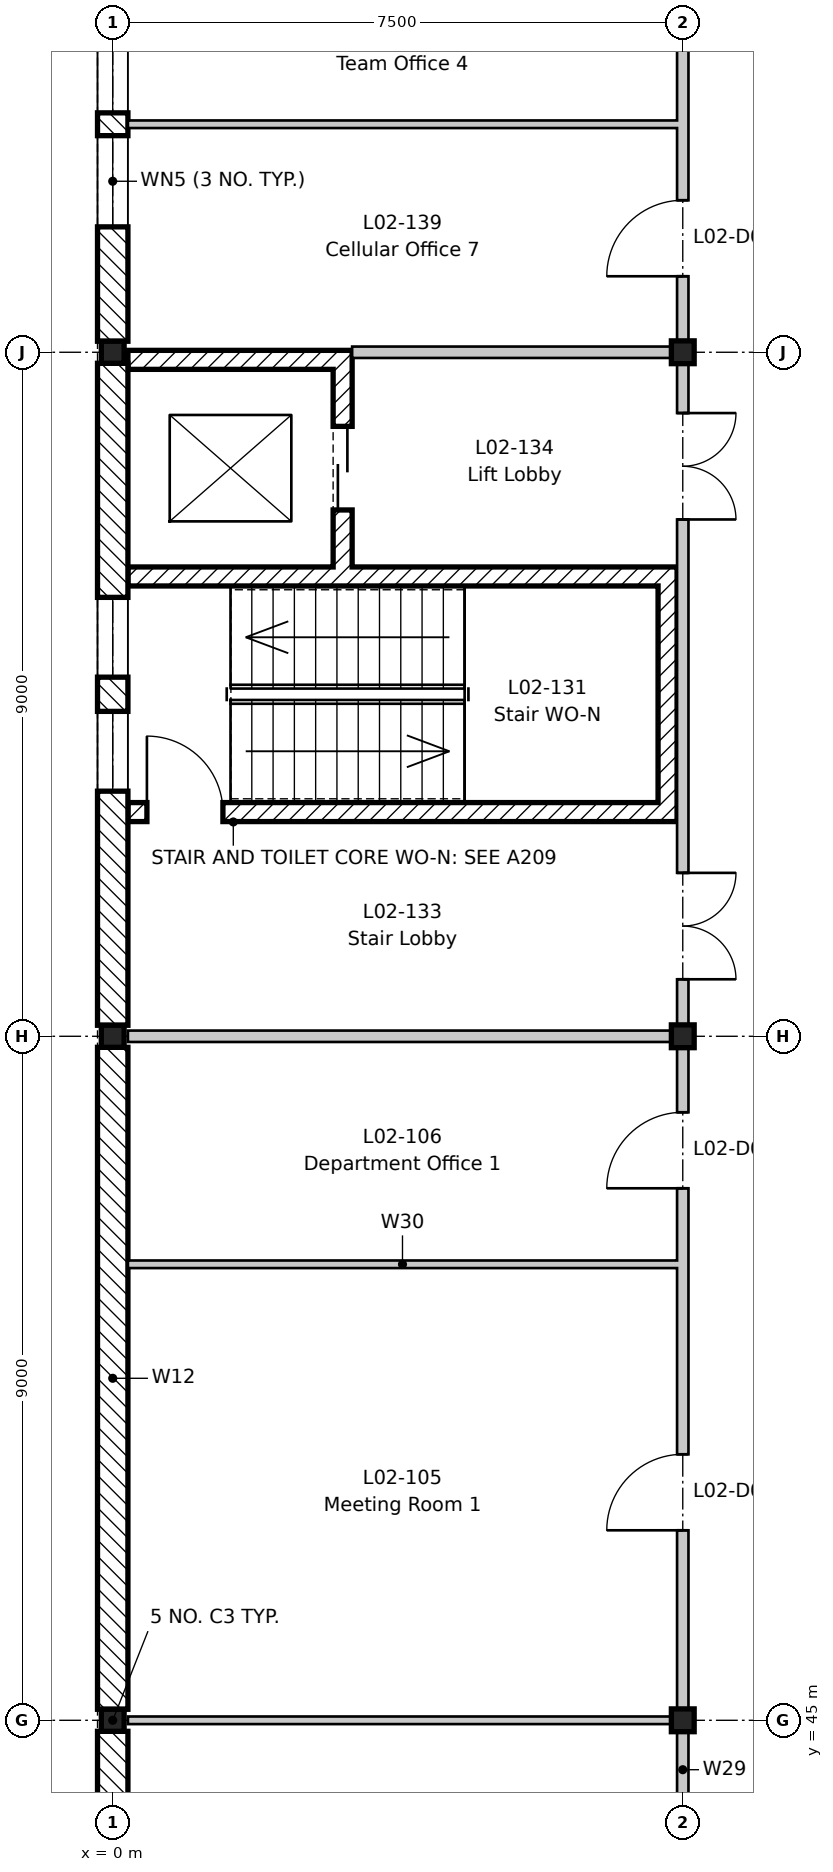
"""IFC4 building model, lengths in metres.
Left out: names, types, materials, properties, quantities, classifications, styles, units other than length and angle.
Written with IfcOpenShell. Run it as: python <this file> out.ifc"""

import sys

from ifc_helpers import new_model, si_unit, direction, frame, frame_2d, origin, origin_2d, place, context, subcontext, project, spatial, rectangle, i_section, extrude, element, fill, save


model = new_model("IFC4")
c1 = context("Model", 3, precision=1e-05, world=origin(), true_north=direction((0.0, 1.0)))
c2 = subcontext(c1, "Body", "Model", "MODEL_VIEW")
j1 = project(units=[si_unit("LENGTHUNIT", "METRE"), si_unit("PLANEANGLEUNIT", "RADIAN")], contexts=[c1])
p1 = place(None, origin())
s1 = spatial("IfcSite", under=j1, at=p1, CompositionType="ELEMENT")
p2 = place(p1, origin())
s2 = spatial("IfcBuilding", under=s1, at=p2, CompositionType="ELEMENT")
p3 = place(p2, frame((0.0, 0.0, 9.9)))
s3 = spatial("IfcBuildingStorey", under=s2, at=p3, CompositionType="ELEMENT", Elevation=9.9)
for number, where, z_axis, x_axis in (
    (1, (0.0, 45.0, -0.2), (0.0, 0.0, 1.0), (1.0, 0.0, 0.0)),
    (2, (0.0, 54.0, -0.2), (0.0, 0.0, 1.0), (1.0, 0.0, 0.0)),
    (3, (0.0, 63.0, -0.2), (0.0, 0.0, 1.0), (1.0, 0.0, 0.0)),
):
    element("IfcColumn", number, at=place(p3, frame(where, z_axis=z_axis, x_axis=x_axis)), inside=s3, PredefinedType="COLUMN", context=c2, shape_type="SweptSolid", body=[
        extrude(i_section(OverallWidth=0.3, OverallDepth=0.29, WebThickness=0.009, FlangeThickness=0.014, FilletRadius=0.027, at=origin_2d()), origin(), (0.0, 0.0, 1.0), 4.5),
    ])
for number, where, z_axis, x_axis in (
    (4, (7.5, 45.0, -0.2), (0.0, 0.0, 1.0), (1.0, 0.0, 0.0)),
    (5, (7.5, 54.0, -0.2), (0.0, 0.0, 1.0), (1.0, 0.0, 0.0)),
    (6, (7.5, 63.0, -0.2), (0.0, 0.0, 1.0), (1.0, 0.0, 0.0)),
):
    element("IfcColumn", number, at=place(p3, frame(where, z_axis=z_axis, x_axis=x_axis)), inside=s3, PredefinedType="COLUMN", context=c2, shape_type="SweptSolid", body=[
        extrude(i_section(OverallWidth=0.3, OverallDepth=0.3, WebThickness=0.011, FlangeThickness=0.019, FilletRadius=0.027, at=origin_2d()), origin(), (0.0, 0.0, 1.0), 4.5),
    ])
p4 = place(p3, frame((0.2, 56.95, 0.0), z_axis=(0.0, 0.0, 1.0), x_axis=(1.0, 0.0, 0.0)))
e7 = element("IfcWall", 7, at=p4, inside=s3, PredefinedType="SHEAR", context=c2, shape_type="SweptSolid", body=[
    extrude(rectangle(XDim=7.225, YDim=0.25, at=frame_2d((3.613, 0.0))), origin(), (0.0, 0.0, 1.0), 4.3),
])
p5 = place(p4, frame((0.25, 0.0, 0.0)))
e8 = element("IfcOpeningElement", 8, at=p5, cuts=e7, PredefinedType="OPENING", context=c2, shape_type="SweptSolid", body=[
    extrude(rectangle(XDim=1.0, YDim=2.1, at=frame_2d((0.5, 1.05))), frame((0.0, 0.135, 0.0), z_axis=(0.0, -1.0, 0.0), x_axis=(1.0, 0.0, 0.0)), (0.0, 0.0, 1.0), 0.27),
])
p6 = place(p3, frame((0.2, 60.05, 0.0), z_axis=(0.0, 0.0, 1.0), x_axis=(1.0, 0.0, 0.0)))
e9 = element("IfcWall", 9, at=p6, inside=s3, PredefinedType="SHEAR", context=c2, shape_type="SweptSolid", body=[
    extrude(rectangle(XDim=7.225, YDim=0.25, at=frame_2d((3.613, 0.0))), origin(), (0.0, 0.0, 1.0), 4.3),
])
p7 = place(p3, frame((7.3, 57.075, 0.0), z_axis=(0.0, 0.0, 1.0), x_axis=(0.0, 1.0, 0.0)))
e10 = element("IfcWall", 10, at=p7, inside=s3, PredefinedType="SHEAR", context=c2, shape_type="SweptSolid", body=[
    extrude(rectangle(XDim=2.85, YDim=0.25, at=frame_2d((1.425, 0.0))), origin(), (0.0, 0.0, 1.0), 4.3),
])
p8 = place(p3, frame((3.025, 60.175, 0.0), z_axis=(0.0, 0.0, 1.0), x_axis=(0.0, 1.0, 0.0)))
e11 = element("IfcWall", 11, at=p8, inside=s3, PredefinedType="SHEAR", context=c2, shape_type="SweptSolid", body=[
    extrude(rectangle(XDim=2.6, YDim=0.25, at=frame_2d((1.3, 0.0))), origin(), (0.0, 0.0, 1.0), 4.3),
])
p9 = place(p8, frame((0.75, 0.0, 0.0)))
e12 = element("IfcOpeningElement", 12, at=p9, cuts=e11, PredefinedType="OPENING", context=c2, shape_type="SweptSolid", body=[
    extrude(rectangle(XDim=1.1, YDim=2.1, at=frame_2d((0.55, 1.05))), frame((0.0, 0.135, 0.0), z_axis=(0.0, -1.0, 0.0), x_axis=(1.0, 0.0, 0.0)), (0.0, 0.0, 1.0), 0.27),
])
p10 = place(p3, frame((0.2, 62.9, 0.0), z_axis=(0.0, 0.0, 1.0), x_axis=(1.0, 0.0, 0.0)))
e13 = element("IfcWall", 13, at=p10, inside=s3, PredefinedType="SHEAR", context=c2, shape_type="SweptSolid", body=[
    extrude(rectangle(XDim=2.95, YDim=0.25, at=frame_2d((1.475, 0.0))), origin(), (0.0, 0.0, 1.0), 4.3),
])
p11 = place(p3, frame((0.0, 36.145, 0.0), z_axis=(0.0, 0.0, 1.0), x_axis=(0.0, 1.0, 0.0)))
e14 = element("IfcWall", 14, at=p11, inside=s3, PredefinedType="STANDARD", context=c2, shape_type="SweptSolid", body=[
    extrude(rectangle(XDim=8.71, YDim=0.4, at=frame_2d((4.355, 0.0))), origin(), (0.0, 0.0, 1.0), 3.9),
])
p12 = place(p11, frame((1.505, 0.0, 0.6)))
e15 = element("IfcOpeningElement", 15, at=p12, cuts=e14, PredefinedType="OPENING", context=c2, shape_type="SweptSolid", body=[
    extrude(rectangle(XDim=1.2, YDim=3.0, at=frame_2d((0.6, 1.5))), frame((0.0, 0.21, 0.0), z_axis=(0.0, -1.0, 0.0), x_axis=(1.0, 0.0, 0.0)), (0.0, 0.0, 1.0), 0.42),
])
p13 = place(p11, frame((3.005, 0.0, 0.6)))
e16 = element("IfcOpeningElement", 16, at=p13, cuts=e14, PredefinedType="OPENING", context=c2, shape_type="SweptSolid", body=[
    extrude(rectangle(XDim=1.2, YDim=3.0, at=frame_2d((0.6, 1.5))), frame((0.0, 0.21, 0.0), z_axis=(0.0, -1.0, 0.0), x_axis=(1.0, 0.0, 0.0)), (0.0, 0.0, 1.0), 0.42),
])
p14 = place(p11, frame((4.505, 0.0, 0.6)))
e17 = element("IfcOpeningElement", 17, at=p14, cuts=e14, PredefinedType="OPENING", context=c2, shape_type="SweptSolid", body=[
    extrude(rectangle(XDim=1.2, YDim=3.0, at=frame_2d((0.6, 1.5))), frame((0.0, 0.21, 0.0), z_axis=(0.0, -1.0, 0.0), x_axis=(1.0, 0.0, 0.0)), (0.0, 0.0, 1.0), 0.42),
])
p15 = place(p11, frame((6.005, 0.0, 0.6)))
e18 = element("IfcOpeningElement", 18, at=p15, cuts=e14, PredefinedType="OPENING", context=c2, shape_type="SweptSolid", body=[
    extrude(rectangle(XDim=1.2, YDim=3.0, at=frame_2d((0.6, 1.5))), frame((0.0, 0.21, 0.0), z_axis=(0.0, -1.0, 0.0), x_axis=(1.0, 0.0, 0.0)), (0.0, 0.0, 1.0), 0.42),
])
p16 = place(p3, frame((0.0, 45.145, 0.0), z_axis=(0.0, 0.0, 1.0), x_axis=(0.0, 1.0, 0.0)))
e19 = element("IfcWall", 19, at=p16, inside=s3, PredefinedType="STANDARD", context=c2, shape_type="SweptSolid", body=[
    extrude(rectangle(XDim=8.71, YDim=0.4, at=frame_2d((4.355, 0.0))), origin(), (0.0, 0.0, 1.0), 3.9),
])
p17 = place(p3, frame((0.0, 54.145, 0.0), z_axis=(0.0, 0.0, 1.0), x_axis=(0.0, 1.0, 0.0)))
e20 = element("IfcWall", 20, at=p17, inside=s3, PredefinedType="STANDARD", context=c2, shape_type="SweptSolid", body=[
    extrude(rectangle(XDim=8.71, YDim=0.4, at=frame_2d((4.355, 0.0))), origin(), (0.0, 0.0, 1.0), 3.9),
])
p18 = place(p17, frame((3.08, 0.0, 0.9)))
e21 = element("IfcOpeningElement", 21, at=p18, cuts=e20, PredefinedType="OPENING", context=c2, shape_type="SweptSolid", body=[
    extrude(rectangle(XDim=1.05, YDim=2.7, at=frame_2d((0.525, 1.35))), frame((0.0, 0.21, 0.0), z_axis=(0.0, -1.0, 0.0), x_axis=(1.0, 0.0, 0.0)), (0.0, 0.0, 1.0), 0.42),
])
p19 = place(p17, frame((4.58, 0.0, 0.9)))
e22 = element("IfcOpeningElement", 22, at=p19, cuts=e20, PredefinedType="OPENING", context=c2, shape_type="SweptSolid", body=[
    extrude(rectangle(XDim=1.05, YDim=2.7, at=frame_2d((0.525, 1.35))), frame((0.0, 0.21, 0.0), z_axis=(0.0, -1.0, 0.0), x_axis=(1.0, 0.0, 0.0)), (0.0, 0.0, 1.0), 0.42),
])
p20 = place(p3, frame((0.0, 63.145, 0.0), z_axis=(0.0, 0.0, 1.0), x_axis=(0.0, 1.0, 0.0)))
e23 = element("IfcWall", 23, at=p20, inside=s3, PredefinedType="STANDARD", context=c2, shape_type="SweptSolid", body=[
    extrude(rectangle(XDim=7.21, YDim=0.4, at=frame_2d((3.605, 0.0))), origin(), (0.0, 0.0, 1.0), 3.9),
])
p21 = place(p20, frame((1.505, 0.0, 0.6)))
e24 = element("IfcOpeningElement", 24, at=p21, cuts=e23, PredefinedType="OPENING", context=c2, shape_type="SweptSolid", body=[
    extrude(rectangle(XDim=1.2, YDim=3.0, at=frame_2d((0.6, 1.5))), frame((0.0, 0.21, 0.0), z_axis=(0.0, -1.0, 0.0), x_axis=(1.0, 0.0, 0.0)), (0.0, 0.0, 1.0), 0.42),
])
p22 = place(p20, frame((3.005, 0.0, 0.6)))
e25 = element("IfcOpeningElement", 25, at=p22, cuts=e23, PredefinedType="OPENING", context=c2, shape_type="SweptSolid", body=[
    extrude(rectangle(XDim=1.2, YDim=3.0, at=frame_2d((0.6, 1.5))), frame((0.0, 0.21, 0.0), z_axis=(0.0, -1.0, 0.0), x_axis=(1.0, 0.0, 0.0)), (0.0, 0.0, 1.0), 0.42),
])
p23 = place(p20, frame((4.505, 0.0, 0.6)))
e26 = element("IfcOpeningElement", 26, at=p23, cuts=e23, PredefinedType="OPENING", context=c2, shape_type="SweptSolid", body=[
    extrude(rectangle(XDim=1.2, YDim=3.0, at=frame_2d((0.6, 1.5))), frame((0.0, 0.21, 0.0), z_axis=(0.0, -1.0, 0.0), x_axis=(1.0, 0.0, 0.0)), (0.0, 0.0, 1.0), 0.42),
])
p24 = place(p3, frame((0.2, 45.0, 0.0), z_axis=(0.0, 0.0, 1.0), x_axis=(1.0, 0.0, 0.0)))
e27 = element("IfcWall", 27, at=p24, inside=s3, PredefinedType="PARTITIONING", context=c2, shape_type="SweptSolid", body=[
    extrude(rectangle(XDim=7.225, YDim=0.1, at=frame_2d((3.613, 0.0))), origin(), (0.0, 0.0, 1.0), 3.95),
])
p25 = place(p3, frame((0.2, 51.0, 0.0), z_axis=(0.0, 0.0, 1.0), x_axis=(1.0, 0.0, 0.0)))
e28 = element("IfcWall", 28, at=p25, inside=s3, PredefinedType="PARTITIONING", context=c2, shape_type="SweptSolid", body=[
    extrude(rectangle(XDim=7.225, YDim=0.1, at=frame_2d((3.613, 0.0))), origin(), (0.0, 0.0, 1.0), 4.3),
])
p26 = place(p3, frame((0.2, 54.0, 0.0), z_axis=(0.0, 0.0, 1.0), x_axis=(1.0, 0.0, 0.0)))
e29 = element("IfcWall", 29, at=p26, inside=s3, PredefinedType="PARTITIONING", context=c2, shape_type="SweptSolid", body=[
    extrude(rectangle(XDim=7.225, YDim=0.15, at=frame_2d((3.613, 0.0))), origin(), (0.0, 0.0, 1.0), 3.95),
])
p27 = place(p3, frame((7.5, -8.8, 0.0), z_axis=(0.0, 0.0, 1.0), x_axis=(0.0, 1.0, 0.0)))
e30 = element("IfcWall", 30, at=p27, inside=s3, PredefinedType="PARTITIONING", context=c2, shape_type="SweptSolid", body=[
    extrude(rectangle(XDim=79.3, YDim=0.15, at=frame_2d((39.65, 0.0))), origin(), (0.0, 0.0, 1.0), 3.78),
])
p28 = place(p27, frame((21.6, 0.0, 0.0)))
e31 = element("IfcOpeningElement", 31, at=p28, cuts=e30, PredefinedType="OPENING", context=c2, shape_type="SweptSolid", body=[
    extrude(rectangle(XDim=1.4, YDim=2.1, at=frame_2d((0.7, 1.05))), frame((0.0, 0.085, 0.0), z_axis=(0.0, -1.0, 0.0), x_axis=(1.0, 0.0, 0.0)), (0.0, 0.0, 1.0), 0.17),
])
p29 = place(p27, frame((29.3, 0.0, 0.0)))
e32 = element("IfcOpeningElement", 32, at=p29, cuts=e30, PredefinedType="OPENING", context=c2, shape_type="SweptSolid", body=[
    extrude(rectangle(XDim=1.0, YDim=2.1, at=frame_2d((0.5, 1.05))), frame((0.0, 0.085, 0.0), z_axis=(0.0, -1.0, 0.0), x_axis=(1.0, 0.0, 0.0)), (0.0, 0.0, 1.0), 0.17),
])
p30 = place(p27, frame((33.8, 0.0, 0.0)))
e33 = element("IfcOpeningElement", 33, at=p30, cuts=e30, PredefinedType="OPENING", context=c2, shape_type="SweptSolid", body=[
    extrude(rectangle(XDim=1.0, YDim=2.1, at=frame_2d((0.5, 1.05))), frame((0.0, 0.085, 0.0), z_axis=(0.0, -1.0, 0.0), x_axis=(1.0, 0.0, 0.0)), (0.0, 0.0, 1.0), 0.17),
])
p31 = place(p27, frame((48.6, 0.0, 0.0)))
e34 = element("IfcOpeningElement", 34, at=p31, cuts=e30, PredefinedType="OPENING", context=c2, shape_type="SweptSolid", body=[
    extrude(rectangle(XDim=1.4, YDim=2.1, at=frame_2d((0.7, 1.05))), frame((0.0, 0.085, 0.0), z_axis=(0.0, -1.0, 0.0), x_axis=(1.0, 0.0, 0.0)), (0.0, 0.0, 1.0), 0.17),
])
p32 = place(p27, frame((56.3, 0.0, 0.0)))
e35 = element("IfcOpeningElement", 35, at=p32, cuts=e30, PredefinedType="OPENING", context=c2, shape_type="SweptSolid", body=[
    extrude(rectangle(XDim=1.0, YDim=2.1, at=frame_2d((0.5, 1.05))), frame((0.0, 0.085, 0.0), z_axis=(0.0, -1.0, 0.0), x_axis=(1.0, 0.0, 0.0)), (0.0, 0.0, 1.0), 0.17),
])
p33 = place(p27, frame((60.8, 0.0, 0.0)))
e36 = element("IfcOpeningElement", 36, at=p33, cuts=e30, PredefinedType="OPENING", context=c2, shape_type="SweptSolid", body=[
    extrude(rectangle(XDim=1.0, YDim=2.1, at=frame_2d((0.5, 1.05))), frame((0.0, 0.085, 0.0), z_axis=(0.0, -1.0, 0.0), x_axis=(1.0, 0.0, 0.0)), (0.0, 0.0, 1.0), 0.17),
])
p34 = place(p27, frame((12.6, 0.0, 0.0)))
e37 = element("IfcOpeningElement", 37, at=p34, cuts=e30, PredefinedType="OPENING", context=c2, shape_type="SweptSolid", body=[
    extrude(rectangle(XDim=1.4, YDim=2.1, at=frame_2d((0.7, 1.05))), frame((0.0, 0.085, 0.0), z_axis=(0.0, -1.0, 0.0), x_axis=(1.0, 0.0, 0.0)), (0.0, 0.0, 1.0), 0.17),
])
p35 = place(p27, frame((3.6, 0.0, 0.0)))
e38 = element("IfcOpeningElement", 38, at=p35, cuts=e30, PredefinedType="OPENING", context=c2, shape_type="SweptSolid", body=[
    extrude(rectangle(XDim=1.4, YDim=2.1, at=frame_2d((0.7, 1.05))), frame((0.0, 0.085, 0.0), z_axis=(0.0, -1.0, 0.0), x_axis=(1.0, 0.0, 0.0)), (0.0, 0.0, 1.0), 0.17),
])
p36 = place(p27, frame((63.55, 0.0, 0.0)))
e39 = element("IfcOpeningElement", 39, at=p36, cuts=e30, PredefinedType="OPENING", context=c2, shape_type="SweptSolid", body=[
    extrude(rectangle(XDim=1.4, YDim=2.1, at=frame_2d((0.7, 1.05))), frame((0.0, 0.085, 0.0), z_axis=(0.0, -1.0, 0.0), x_axis=(1.0, 0.0, 0.0)), (0.0, 0.0, 1.0), 0.17),
])
p37 = place(p27, frame((69.6, 0.0, 0.0)))
e40 = element("IfcOpeningElement", 40, at=p37, cuts=e30, PredefinedType="OPENING", context=c2, shape_type="SweptSolid", body=[
    extrude(rectangle(XDim=1.4, YDim=2.1, at=frame_2d((0.7, 1.05))), frame((0.0, 0.085, 0.0), z_axis=(0.0, -1.0, 0.0), x_axis=(1.0, 0.0, 0.0)), (0.0, 0.0, 1.0), 0.17),
])
p38 = place(p27, frame((42.85, 0.0, 0.0)))
e41 = element("IfcOpeningElement", 41, at=p38, cuts=e30, PredefinedType="OPENING", context=c2, shape_type="SweptSolid", body=[
    extrude(rectangle(XDim=1.0, YDim=2.1, at=frame_2d((0.5, 1.05))), frame((0.0, 0.085, 0.0), z_axis=(0.0, -1.0, 0.0), x_axis=(1.0, 0.0, 0.0)), (0.0, 0.0, 1.0), 0.17),
])
p39 = place(p27, frame((36.55, 0.0, 0.0)))
e42 = element("IfcOpeningElement", 42, at=p39, cuts=e30, PredefinedType="OPENING", context=c2, shape_type="SweptSolid", body=[
    extrude(rectangle(XDim=1.4, YDim=2.1, at=frame_2d((0.7, 1.05))), frame((0.0, 0.085, 0.0), z_axis=(0.0, -1.0, 0.0), x_axis=(1.0, 0.0, 0.0)), (0.0, 0.0, 1.0), 0.17),
])
p40 = place(p27, frame((72.8, 0.0, 0.0)))
e43 = element("IfcOpeningElement", 43, at=p40, cuts=e30, PredefinedType="OPENING", context=c2, shape_type="SweptSolid", body=[
    extrude(rectangle(XDim=1.0, YDim=2.1, at=frame_2d((0.5, 1.05))), frame((0.0, 0.085, 0.0), z_axis=(0.0, -1.0, 0.0), x_axis=(1.0, 0.0, 0.0)), (0.0, 0.0, 1.0), 0.17),
])
p41 = place(p3, frame((3.15, 63.0, 0.0), z_axis=(0.0, 0.0, 1.0), x_axis=(1.0, 0.0, 0.0)))
e44 = element("IfcWall", 44, at=p41, inside=s3, PredefinedType="PARTITIONING", context=c2, shape_type="SweptSolid", body=[
    extrude(rectangle(XDim=4.275, YDim=0.15, at=frame_2d((2.138, 0.0))), origin(), (0.0, 0.0, 1.0), 3.95),
])
p42 = place(p3, frame((0.2, 66.0, 0.0), z_axis=(0.0, 0.0, 1.0), x_axis=(1.0, 0.0, 0.0)))
e45 = element("IfcWall", 45, at=p42, inside=s3, PredefinedType="PARTITIONING", context=c2, shape_type="SweptSolid", body=[
    extrude(rectangle(XDim=7.225, YDim=0.1, at=frame_2d((3.613, 0.0))), origin(), (0.0, 0.0, 1.0), 4.3),
])
p43 = place(p18, origin())
e46 = element("IfcWindow", 46, at=p43, inside=s3, PartitioningType="SINGLE_PANEL", PredefinedType="WINDOW", context=c2, shape_type="SweptSolid", body=[
    extrude(rectangle(XDim=1.05, YDim=2.7, at=frame_2d((0.525, 1.35))), frame((0.0, 0.03, 0.0), z_axis=(0.0, -1.0, 0.0), x_axis=(1.0, 0.0, 0.0)), (0.0, 0.0, 1.0), 0.06),
])
fill(e21, e46)
p44 = place(p19, origin())
e47 = element("IfcWindow", 47, at=p44, inside=s3, PartitioningType="SINGLE_PANEL", PredefinedType="WINDOW", context=c2, shape_type="SweptSolid", body=[
    extrude(rectangle(XDim=1.05, YDim=2.7, at=frame_2d((0.525, 1.35))), frame((0.0, 0.03, 0.0), z_axis=(0.0, -1.0, 0.0), x_axis=(1.0, 0.0, 0.0)), (0.0, 0.0, 1.0), 0.06),
])
fill(e22, e47)
p45 = place(p21, origin())
e48 = element("IfcWindow", 48, at=p45, inside=s3, PartitioningType="SINGLE_PANEL", PredefinedType="WINDOW", context=c2, shape_type="SweptSolid", body=[
    extrude(rectangle(XDim=1.2, YDim=3.0, at=frame_2d((0.6, 1.5))), frame((0.0, 0.03, 0.0), z_axis=(0.0, -1.0, 0.0), x_axis=(1.0, 0.0, 0.0)), (0.0, 0.0, 1.0), 0.06),
])
fill(e24, e48)
p46 = place(p22, origin())
e49 = element("IfcWindow", 49, at=p46, inside=s3, PartitioningType="SINGLE_PANEL", PredefinedType="WINDOW", context=c2, shape_type="SweptSolid", body=[
    extrude(rectangle(XDim=1.2, YDim=3.0, at=frame_2d((0.6, 1.5))), frame((0.0, 0.03, 0.0), z_axis=(0.0, -1.0, 0.0), x_axis=(1.0, 0.0, 0.0)), (0.0, 0.0, 1.0), 0.06),
])
fill(e25, e49)
p47 = place(p32, origin())
e50 = element("IfcDoor", 50, at=p47, inside=s3, OperationType="SINGLE_SWING_LEFT", PredefinedType="DOOR", context=c2, shape_type="SweptSolid", body=[
    extrude(rectangle(XDim=1.0, YDim=2.1, at=frame_2d((0.5, 1.05))), frame((0.0, 0.025, 0.0), z_axis=(0.0, -1.0, 0.0), x_axis=(1.0, 0.0, 0.0)), (0.0, 0.0, 1.0), 0.05),
])
fill(e35, e50)
p48 = place(p33, origin())
e51 = element("IfcDoor", 51, at=p48, inside=s3, OperationType="SINGLE_SWING_LEFT", PredefinedType="DOOR", context=c2, shape_type="SweptSolid", body=[
    extrude(rectangle(XDim=1.0, YDim=2.1, at=frame_2d((0.5, 1.05))), frame((0.0, 0.025, 0.0), z_axis=(0.0, -1.0, 0.0), x_axis=(1.0, 0.0, 0.0)), (0.0, 0.0, 1.0), 0.05),
])
fill(e36, e51)
p49 = place(p5, origin())
e52 = element("IfcDoor", 52, at=p49, inside=s3, OperationType="SINGLE_SWING_LEFT", PredefinedType="DOOR", context=c2, shape_type="SweptSolid", body=[
    extrude(rectangle(XDim=1.0, YDim=2.1, at=frame_2d((0.5, 1.05))), frame((0.0, 0.025, 0.0), z_axis=(0.0, -1.0, 0.0), x_axis=(1.0, 0.0, 0.0)), (0.0, 0.0, 1.0), 0.05),
])
fill(e8, e52)
p50 = place(p36, frame((1.4, 0.0, 0.0), z_axis=(0.0, 0.0, 1.0), x_axis=(-1.0, 0.0, 0.0)))
e53 = element("IfcDoor", 53, at=p50, inside=s3, OperationType="DOUBLE_DOOR_SINGLE_SWING", PredefinedType="DOOR", context=c2, shape_type="SweptSolid", body=[
    extrude(rectangle(XDim=1.4, YDim=2.1, at=frame_2d((0.7, 1.05))), frame((0.0, 0.025, 0.0), z_axis=(0.0, -1.0, 0.0), x_axis=(1.0, 0.0, 0.0)), (0.0, 0.0, 1.0), 0.05),
])
fill(e39, e53)
p51 = place(p37, frame((1.4, 0.0, 0.0), z_axis=(0.0, 0.0, 1.0), x_axis=(-1.0, 0.0, 0.0)))
e54 = element("IfcDoor", 54, at=p51, inside=s3, OperationType="DOUBLE_DOOR_SINGLE_SWING", PredefinedType="DOOR", context=c2, shape_type="SweptSolid", body=[
    extrude(rectangle(XDim=1.4, YDim=2.1, at=frame_2d((0.7, 1.05))), frame((0.0, 0.025, 0.0), z_axis=(0.0, -1.0, 0.0), x_axis=(1.0, 0.0, 0.0)), (0.0, 0.0, 1.0), 0.05),
])
fill(e40, e54)
p52 = place(p40, origin())
e55 = element("IfcDoor", 55, at=p52, inside=s3, OperationType="SINGLE_SWING_LEFT", PredefinedType="DOOR", context=c2, shape_type="SweptSolid", body=[
    extrude(rectangle(XDim=1.0, YDim=2.1, at=frame_2d((0.5, 1.05))), frame((0.0, 0.025, 0.0), z_axis=(0.0, -1.0, 0.0), x_axis=(1.0, 0.0, 0.0)), (0.0, 0.0, 1.0), 0.05),
])
fill(e43, e55)
p53 = place(p9, origin())
e56 = element("IfcDoor", 56, at=p53, inside=s3, OperationType="SLIDING_TO_LEFT", PredefinedType="DOOR", context=c2, shape_type="SweptSolid", body=[
    extrude(rectangle(XDim=1.1, YDim=2.1, at=frame_2d((0.55, 1.05))), frame((0.0, 0.025, 0.0), z_axis=(0.0, -1.0, 0.0), x_axis=(1.0, 0.0, 0.0)), (0.0, 0.0, 1.0), 0.05),
])
fill(e12, e56)
save(model, sys.argv[1])
